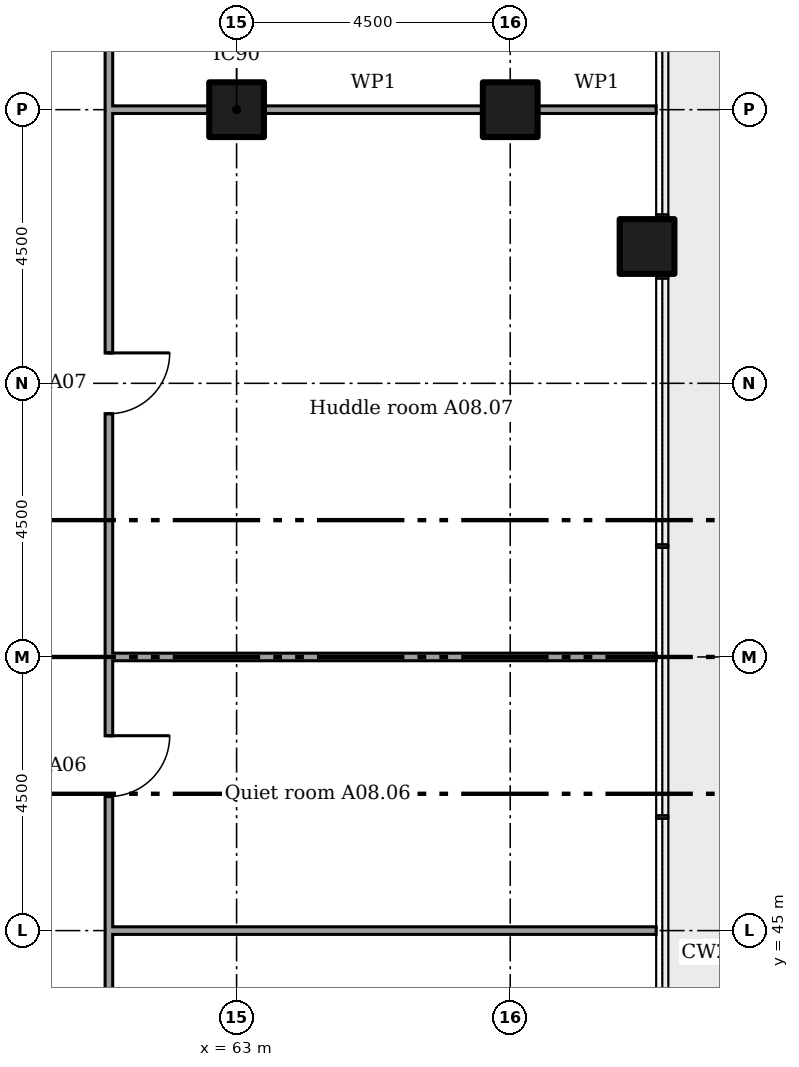
"""IFC4 building model, lengths in metres.
Left out: names, types, materials, properties, quantities, classifications, styles, units other than length and angle.
Written with IfcOpenShell. Run it as: python <this file> out.ifc"""

import sys

from ifc_helpers import new_model, si_unit, direction, frame, frame_2d, origin, origin_2d, place, context, subcontext, project, spatial, rectangle, extrude, element, fill, save


model = new_model("IFC4")
c1 = context("Model", 3, precision=1e-05, world=origin(), true_north=direction((0.0, 1.0)))
c2 = subcontext(c1, "Body", "Model", "MODEL_VIEW")
j1 = project(units=[si_unit("LENGTHUNIT", "METRE"), si_unit("PLANEANGLEUNIT", "RADIAN")], contexts=[c1])
p1 = place(None, origin())
s1 = spatial("IfcSite", under=j1, at=p1, CompositionType="ELEMENT")
p2 = place(p1, origin())
s2 = spatial("IfcBuilding", under=s1, at=p2, CompositionType="ELEMENT")
p3 = place(p2, frame((0.0, 0.0, 38.6)))
s3 = spatial("IfcBuildingStorey", under=s2, at=p3, CompositionType="ELEMENT", Elevation=38.6)
for number, where in (
    (1, (63.0, 58.5, 0.0)),
    (2, (67.5, 58.5, 0.0)),
    (3, (69.75, 56.25, 0.0)),
):
    element("IfcColumn", number, at=place(p3, frame(where)), inside=s3, PredefinedType="COLUMN", context=c2, shape_type="SweptSolid", body=[
        extrude(rectangle(XDim=0.9, YDim=0.9, at=origin_2d()), origin(), (0.0, 0.0, 1.0), 4.4),
    ])
for number, where in (
    (4, (60.9, 45.0, 0.0)),
    (5, (60.9, 49.5, 0.0)),
):
    element("IfcWall", number, at=place(p3, frame(where)), inside=s3, PredefinedType="PARTITIONING", context=c2, shape_type="SweptSolid", body=[
        extrude(rectangle(XDim=9.0, YDim=0.125, at=frame_2d((4.5, 0.0))), origin(), (0.0, 0.0, 1.0), 3.467),
    ])
p4 = place(p3, frame((60.9, 58.5, 0.0)))
e6 = element("IfcWall", 6, at=p4, inside=s3, PredefinedType="PARTITIONING", context=c2, shape_type="SweptSolid", body=[
    extrude(rectangle(XDim=1.65, YDim=0.125, at=frame_2d((0.825, 0.0))), origin(), (0.0, 0.0, 1.0), 3.302),
])
p5 = place(p3, frame((63.45, 58.5, 0.0)))
e7 = element("IfcWall", 7, at=p5, inside=s3, PredefinedType="PARTITIONING", context=c2, shape_type="SweptSolid", body=[
    extrude(rectangle(XDim=3.6, YDim=0.125, at=frame_2d((1.8, 0.0))), origin(), (0.0, 0.0, 1.0), 3.302),
])
p6 = place(p3, frame((67.95, 58.5, 0.0)))
e8 = element("IfcWall", 8, at=p6, inside=s3, PredefinedType="PARTITIONING", context=c2, shape_type="SweptSolid", body=[
    extrude(rectangle(XDim=1.95, YDim=0.125, at=frame_2d((0.975, 0.0))), origin(), (0.0, 0.0, 1.0), 3.302),
])
p7 = place(p3, frame((60.9, 37.863, 0.0), z_axis=(0.0, 0.0, 1.0), x_axis=(0.0, 1.0, 0.0)))
e9 = element("IfcWall", 9, at=p7, inside=s3, PredefinedType="PARTITIONING", context=c2, shape_type="SweptSolid", body=[
    extrude(rectangle(XDim=22.975, YDim=0.125, at=frame_2d((11.487, 0.0))), origin(), (0.0, 0.0, 1.0), 4.225),
])
p8 = place(p7, frame((3.933, 0.0, 0.0)))
e10 = element("IfcOpeningElement", 10, at=p8, cuts=e9, PredefinedType="OPENING", context=c2, shape_type="SweptSolid", body=[
    extrude(rectangle(XDim=1.0, YDim=2.1, at=frame_2d((0.5, 1.05))), frame((0.0, 0.073, 0.0), z_axis=(0.0, -1.0, 0.0), x_axis=(1.0, 0.0, 0.0)), (0.0, 0.0, 1.0), 0.145),
])
p9 = place(p7, frame((9.343, 0.0, 0.0)))
e11 = element("IfcOpeningElement", 11, at=p9, cuts=e9, PredefinedType="OPENING", context=c2, shape_type="SweptSolid", body=[
    extrude(rectangle(XDim=1.0, YDim=2.1, at=frame_2d((0.5, 1.05))), frame((0.0, 0.073, 0.0), z_axis=(0.0, -1.0, 0.0), x_axis=(1.0, 0.0, 0.0)), (0.0, 0.0, 1.0), 0.145),
])
p10 = place(p7, frame((15.637, 0.0, 0.0)))
e12 = element("IfcOpeningElement", 12, at=p10, cuts=e9, PredefinedType="OPENING", context=c2, shape_type="SweptSolid", body=[
    extrude(rectangle(XDim=1.0, YDim=2.1, at=frame_2d((0.5, 1.05))), frame((0.0, 0.073, 0.0), z_axis=(0.0, -1.0, 0.0), x_axis=(1.0, 0.0, 0.0)), (0.0, 0.0, 1.0), 0.145),
])
p11 = place(p9, frame((1.0, 0.0, 0.0), x_axis=(-1.0, 0.0, 0.0)))
e13 = element("IfcDoor", 13, at=p11, inside=s3, OperationType="SINGLE_SWING_RIGHT", PredefinedType="DOOR", context=c2, shape_type="SweptSolid", body=[
    extrude(rectangle(XDim=1.0, YDim=2.1, at=frame_2d((0.5, 1.05))), frame((0.0, 0.025, 0.0), z_axis=(0.0, -1.0, 0.0), x_axis=(1.0, 0.0, 0.0)), (0.0, 0.0, 1.0), 0.05),
])
fill(e11, e13)
p12 = place(p10, frame((1.0, 0.0, 0.0), x_axis=(-1.0, 0.0, 0.0)))
e14 = element("IfcDoor", 14, at=p12, inside=s3, OperationType="SINGLE_SWING_RIGHT", PredefinedType="DOOR", context=c2, shape_type="SweptSolid", body=[
    extrude(rectangle(XDim=1.0, YDim=2.1, at=frame_2d((0.5, 1.05))), frame((0.0, 0.025, 0.0), z_axis=(0.0, -1.0, 0.0), x_axis=(1.0, 0.0, 0.0)), (0.0, 0.0, 1.0), 0.05),
])
fill(e12, e14)
save(model, sys.argv[1])
